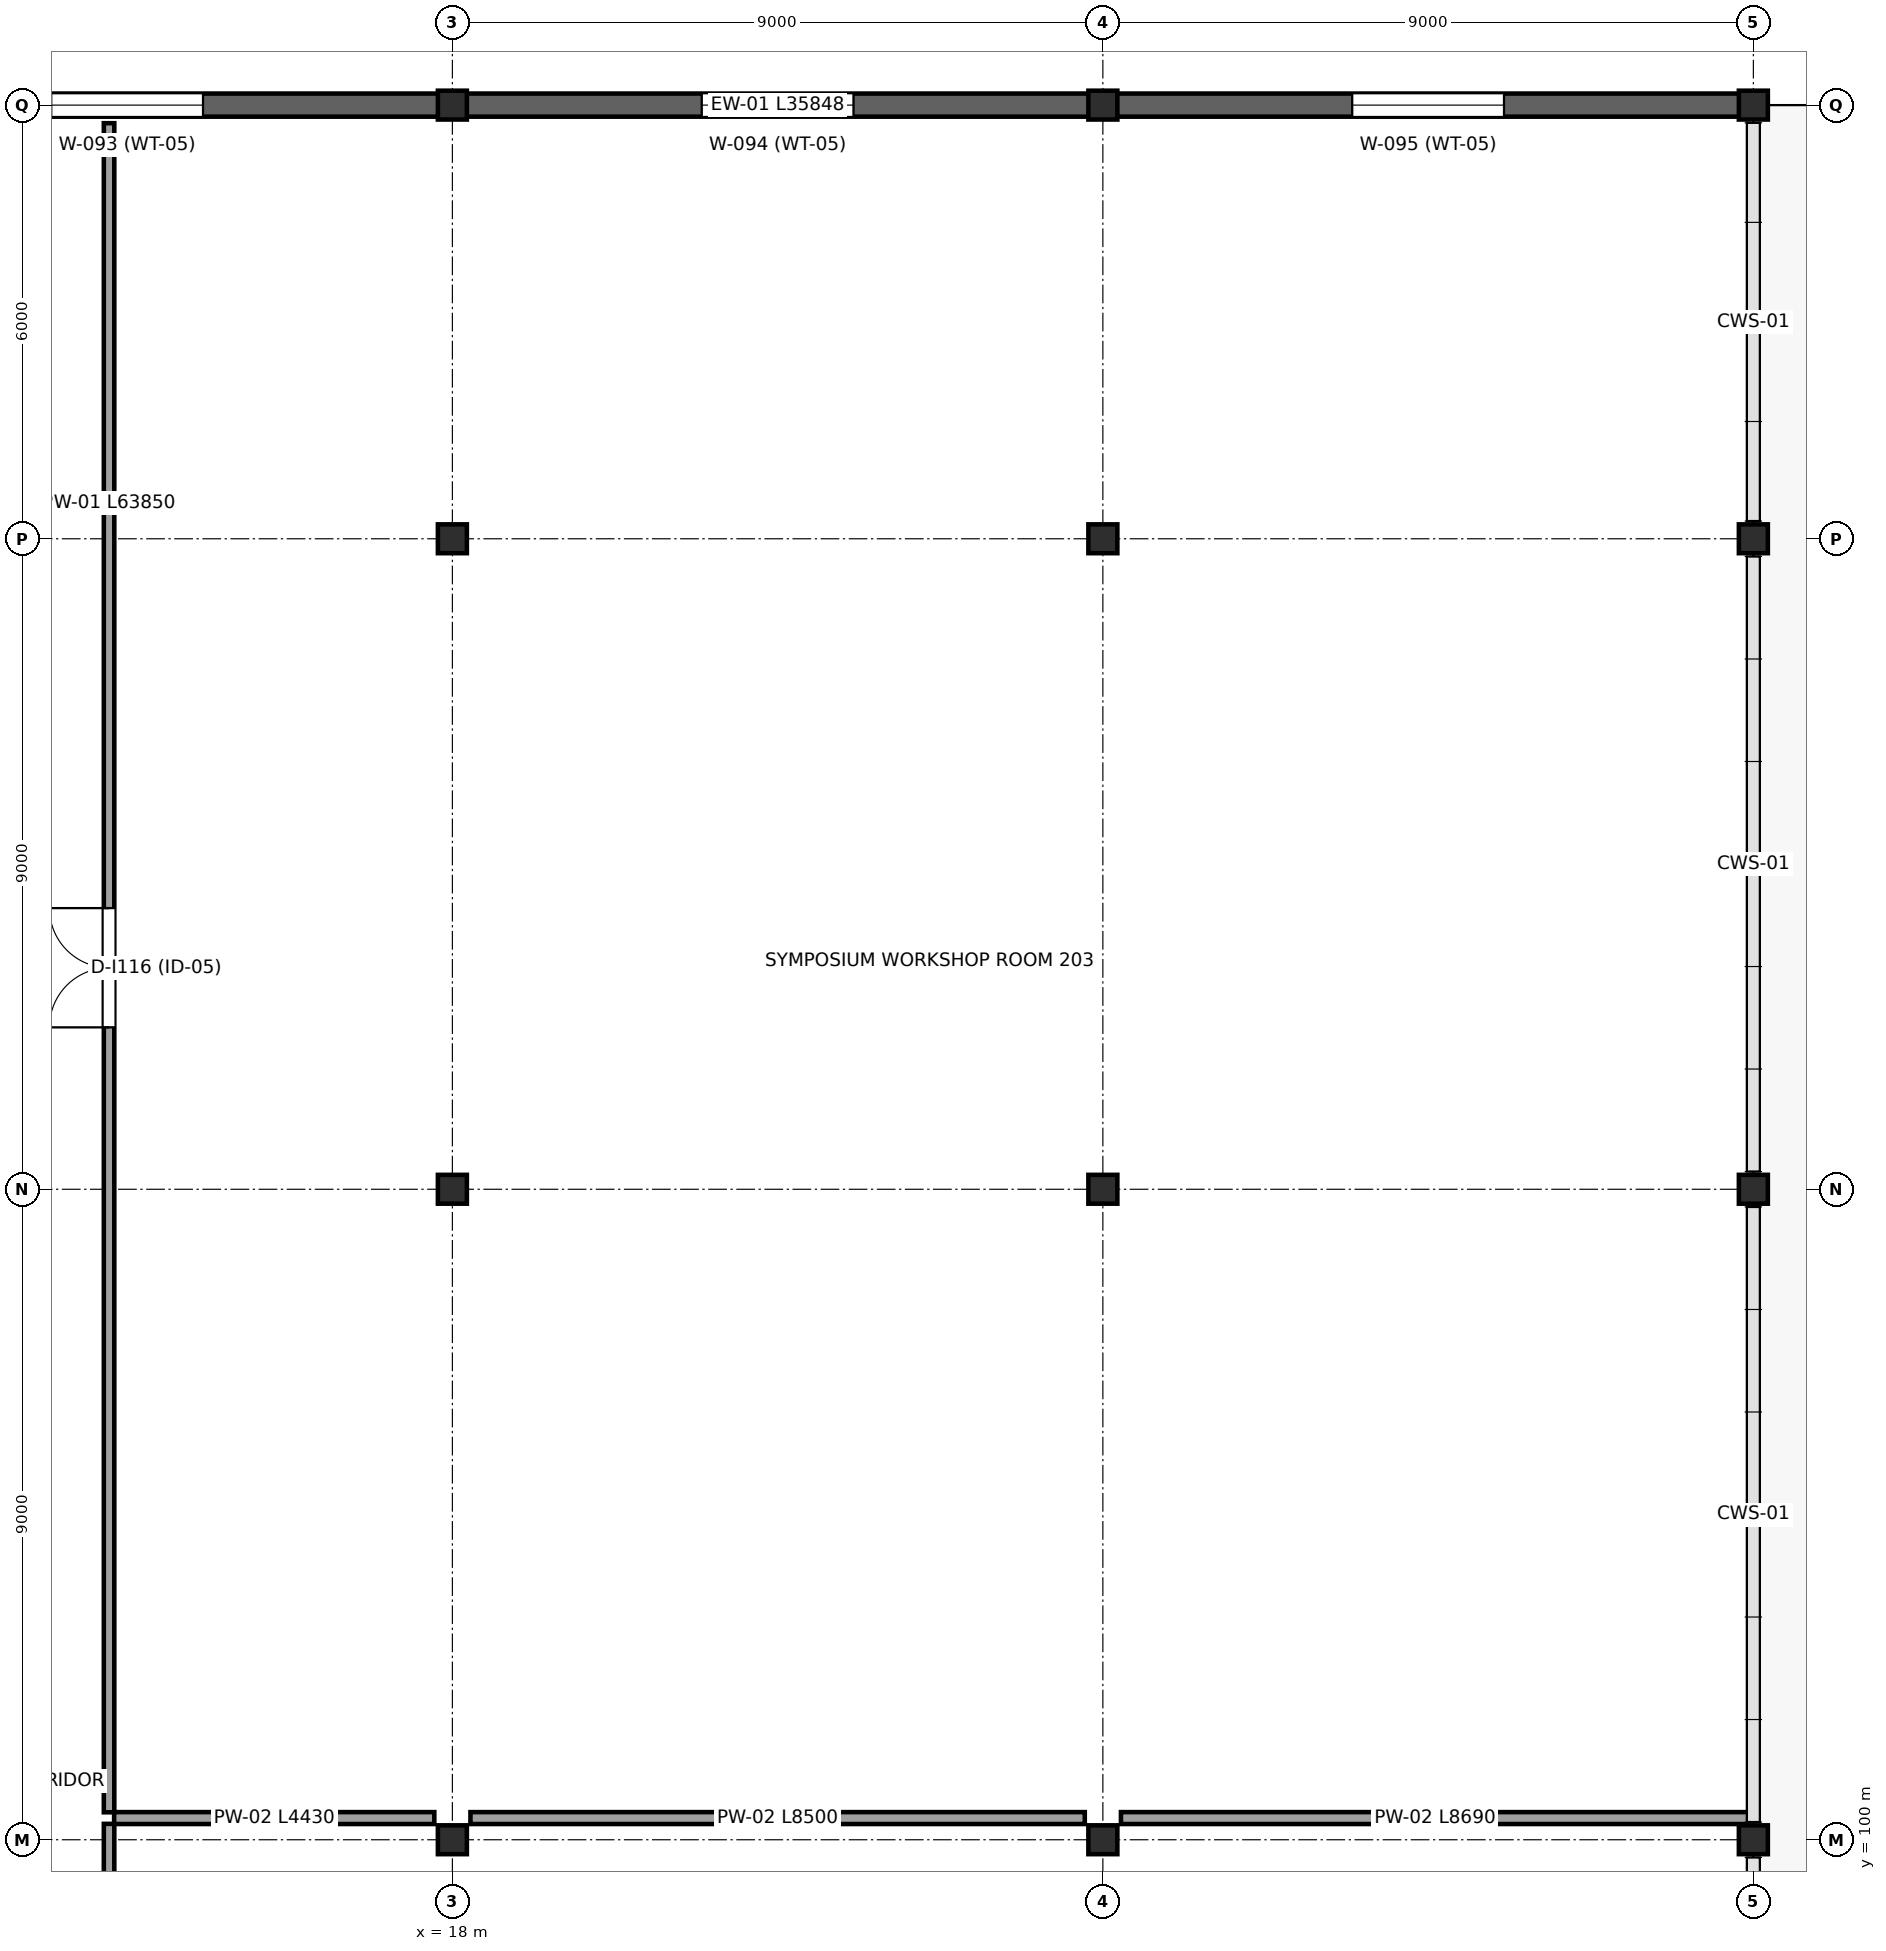
"""IFC4 building model, lengths in metres.
Left out: names, types, materials, properties, quantities, classifications, styles, units other than length and angle.
Written with IfcOpenShell. Run it as: python <this file> out.ifc"""

import sys

from ifc_helpers import new_model, si_unit, direction, frame, frame_2d, origin, origin_2d, place, context, subcontext, project, spatial, rectangle, i_section, extrude, element, fill, save


model = new_model("IFC4")
c1 = context("Model", 3, precision=1e-05, world=origin(), true_north=direction((0.0, 1.0)))
c2 = subcontext(c1, "Body", "Model", "MODEL_VIEW")
j1 = project(units=[si_unit("LENGTHUNIT", "METRE"), si_unit("PLANEANGLEUNIT", "RADIAN")], contexts=[c1])
p1 = place(None, origin())
s1 = spatial("IfcSite", under=j1, at=p1, CompositionType="ELEMENT")
p2 = place(p1, origin())
s2 = spatial("IfcBuilding", under=s1, at=p2, CompositionType="ELEMENT")
p3 = place(p2, frame((0.0, 0.0, 12.0)))
s3 = spatial("IfcBuildingStorey", under=s2, at=p3, CompositionType="ELEMENT", Elevation=12.0)
for number, where, z_axis, x_axis in (
    (1, (18.0, 100.0, 0.0), (0.0, 0.0, 1.0), (1.0, 0.0, 0.0)),
    (2, (18.0, 109.0, 0.0), (0.0, 0.0, 1.0), (1.0, 0.0, 0.0)),
    (3, (18.0, 118.0, 0.0), (0.0, 0.0, 1.0), (1.0, 0.0, 0.0)),
    (4, (18.0, 124.0, 0.0), (0.0, 0.0, 1.0), (1.0, 0.0, 0.0)),
    (5, (27.0, 100.0, 0.0), (0.0, 0.0, 1.0), (1.0, 0.0, 0.0)),
    (6, (27.0, 109.0, 0.0), (0.0, 0.0, 1.0), (1.0, 0.0, 0.0)),
    (7, (27.0, 118.0, 0.0), (0.0, 0.0, 1.0), (1.0, 0.0, 0.0)),
    (8, (27.0, 124.0, 0.0), (0.0, 0.0, 1.0), (1.0, 0.0, 0.0)),
    (9, (36.0, 100.0, 0.0), (0.0, 0.0, 1.0), (1.0, 0.0, 0.0)),
    (10, (36.0, 109.0, 0.0), (0.0, 0.0, 1.0), (1.0, 0.0, 0.0)),
    (11, (36.0, 118.0, 0.0), (0.0, 0.0, 1.0), (1.0, 0.0, 0.0)),
    (12, (36.0, 124.0, 0.0), (0.0, 0.0, 1.0), (1.0, 0.0, 0.0)),
):
    element("IfcColumn", number, at=place(p3, frame(where, z_axis=z_axis, x_axis=x_axis)), inside=s3, PredefinedType="COLUMN", context=c2, shape_type="SweptSolid", body=[
        extrude(i_section(OverallWidth=0.401, OverallDepth=0.399, WebThickness=0.025, FlangeThickness=0.04, at=origin_2d()), origin(), (0.0, 0.0, 1.0), 4.5),
    ])
p4 = place(p3, frame((9.019, 124.0, 0.0), z_axis=(0.0, 0.0, 1.0), x_axis=(1.0, 0.0, 0.0)))
e13 = element("IfcWall", 13, at=p4, inside=s3, PredefinedType="STANDARD", context=c2, shape_type="SweptSolid", body=[
    extrude(rectangle(XDim=8.962, YDim=0.32, at=frame_2d((4.481, 0.0))), origin(), (0.0, 0.0, 1.0), 4.28),
])
p5 = place(p4, frame((3.431, 0.0, 1.0)))
e14 = element("IfcOpeningElement", 14, at=p5, cuts=e13, PredefinedType="OPENING", context=c2, shape_type="SweptSolid", body=[
    extrude(rectangle(XDim=2.1, YDim=2.25, at=frame_2d((1.05, 1.125))), frame((0.0, 0.17, 0.0), z_axis=(0.0, -1.0, 0.0), x_axis=(1.0, 0.0, 0.0)), (0.0, 0.0, 1.0), 0.34),
])
p6 = place(p3, frame((18.019, 124.0, 0.0), z_axis=(0.0, 0.0, 1.0), x_axis=(1.0, 0.0, 0.0)))
e15 = element("IfcWall", 15, at=p6, inside=s3, PredefinedType="STANDARD", context=c2, shape_type="SweptSolid", body=[
    extrude(rectangle(XDim=8.962, YDim=0.32, at=frame_2d((4.481, 0.0))), origin(), (0.0, 0.0, 1.0), 4.28),
])
p7 = place(p6, frame((3.431, 0.0, 1.0)))
e16 = element("IfcOpeningElement", 16, at=p7, cuts=e15, PredefinedType="OPENING", context=c2, shape_type="SweptSolid", body=[
    extrude(rectangle(XDim=2.1, YDim=2.25, at=frame_2d((1.05, 1.125))), frame((0.0, 0.17, 0.0), z_axis=(0.0, -1.0, 0.0), x_axis=(1.0, 0.0, 0.0)), (0.0, 0.0, 1.0), 0.34),
])
p8 = place(p3, frame((27.019, 124.0, 0.0), z_axis=(0.0, 0.0, 1.0), x_axis=(1.0, 0.0, 0.0)))
e17 = element("IfcWall", 17, at=p8, inside=s3, PredefinedType="STANDARD", context=c2, shape_type="SweptSolid", body=[
    extrude(rectangle(XDim=8.962, YDim=0.32, at=frame_2d((4.481, 0.0))), origin(), (0.0, 0.0, 1.0), 4.28),
])
p9 = place(p8, frame((3.431, 0.0, 1.0)))
e18 = element("IfcOpeningElement", 18, at=p9, cuts=e17, PredefinedType="OPENING", context=c2, shape_type="SweptSolid", body=[
    extrude(rectangle(XDim=2.1, YDim=2.25, at=frame_2d((1.05, 1.125))), frame((0.0, 0.17, 0.0), z_axis=(0.0, -1.0, 0.0), x_axis=(1.0, 0.0, 0.0)), (0.0, 0.0, 1.0), 0.34),
])
p10 = place(p3, frame((13.25, 77.38, 0.0), z_axis=(0.0, 0.0, 1.0), x_axis=(0.0, 1.0, 0.0)))
e19 = element("IfcWall", 19, at=p10, inside=s3, PredefinedType="PARTITIONING", context=c2, shape_type="SweptSolid", body=[
    extrude(rectangle(XDim=22.84, YDim=0.145, at=frame_2d((11.42, 0.0))), origin(), (0.0, 0.0, 1.0), 3.6),
])
p11 = place(p10, frame((10.595, 0.0, 0.0)))
e20 = element("IfcOpeningElement", 20, at=p11, cuts=e19, PredefinedType="OPENING", context=c2, shape_type="SweptSolid", body=[
    extrude(rectangle(XDim=1.65, YDim=2.25, at=frame_2d((0.825, 1.125))), frame((0.0, 0.083, 0.0), z_axis=(0.0, -1.0, 0.0), x_axis=(1.0, 0.0, 0.0)), (0.0, 0.0, 1.0), 0.165),
])
p12 = place(p3, frame((13.25, 100.38, 0.0), z_axis=(0.0, 0.0, 1.0), x_axis=(0.0, 1.0, 0.0)))
e21 = element("IfcWall", 21, at=p12, inside=s3, PredefinedType="PARTITIONING", context=c2, shape_type="SweptSolid", body=[
    extrude(rectangle(XDim=23.37, YDim=0.145, at=frame_2d((11.685, 0.0))), origin(), (0.0, 0.0, 1.0), 3.6),
])
p13 = place(p12, frame((10.86, 0.0, 0.0)))
e22 = element("IfcOpeningElement", 22, at=p13, cuts=e21, PredefinedType="OPENING", context=c2, shape_type="SweptSolid", body=[
    extrude(rectangle(XDim=1.65, YDim=2.25, at=frame_2d((0.825, 1.125))), frame((0.0, 0.083, 0.0), z_axis=(0.0, -1.0, 0.0), x_axis=(1.0, 0.0, 0.0)), (0.0, 0.0, 1.0), 0.165),
])
p14 = place(p3, frame((13.32, 100.3, 0.0), z_axis=(0.0, 0.0, 1.0), x_axis=(1.0, 0.0, 0.0)))
e23 = element("IfcWall", 23, at=p14, inside=s3, PredefinedType="PARTITIONING", context=c2, shape_type="SweptSolid", body=[
    extrude(rectangle(XDim=4.43, YDim=0.165, at=frame_2d((2.215, 0.0))), origin(), (0.0, 0.0, 1.0), 3.6),
])
p15 = place(p3, frame((18.25, 100.3, 0.0), z_axis=(0.0, 0.0, 1.0), x_axis=(1.0, 0.0, 0.0)))
e24 = element("IfcWall", 24, at=p15, inside=s3, PredefinedType="PARTITIONING", context=c2, shape_type="SweptSolid", body=[
    extrude(rectangle(XDim=8.5, YDim=0.165, at=frame_2d((4.25, 0.0))), origin(), (0.0, 0.0, 1.0), 3.6),
])
p16 = place(p3, frame((27.25, 100.3, 0.0), z_axis=(0.0, 0.0, 1.0), x_axis=(1.0, 0.0, 0.0)))
e25 = element("IfcWall", 25, at=p16, inside=s3, PredefinedType="PARTITIONING", context=c2, shape_type="SweptSolid", body=[
    extrude(rectangle(XDim=8.69, YDim=0.165, at=frame_2d((4.345, 0.0))), origin(), (0.0, 0.0, 1.0), 3.6),
])
p17 = place(p5, origin())
e26 = element("IfcWindow", 26, at=p17, inside=s3, PartitioningType="SINGLE_PANEL", PredefinedType="WINDOW", context=c2, shape_type="SweptSolid", body=[
    extrude(rectangle(XDim=2.1, YDim=2.25, at=frame_2d((1.05, 1.125))), frame((0.0, 0.03, 0.0), z_axis=(0.0, -1.0, 0.0), x_axis=(1.0, 0.0, 0.0)), (0.0, 0.0, 1.0), 0.06),
])
fill(e14, e26)
p18 = place(p7, origin())
e27 = element("IfcWindow", 27, at=p18, inside=s3, PartitioningType="SINGLE_PANEL", PredefinedType="WINDOW", context=c2, shape_type="SweptSolid", body=[
    extrude(rectangle(XDim=2.1, YDim=2.25, at=frame_2d((1.05, 1.125))), frame((0.0, 0.03, 0.0), z_axis=(0.0, -1.0, 0.0), x_axis=(1.0, 0.0, 0.0)), (0.0, 0.0, 1.0), 0.06),
])
fill(e16, e27)
p19 = place(p9, origin())
e28 = element("IfcWindow", 28, at=p19, inside=s3, PartitioningType="SINGLE_PANEL", PredefinedType="WINDOW", context=c2, shape_type="SweptSolid", body=[
    extrude(rectangle(XDim=2.1, YDim=2.25, at=frame_2d((1.05, 1.125))), frame((0.0, 0.03, 0.0), z_axis=(0.0, -1.0, 0.0), x_axis=(1.0, 0.0, 0.0)), (0.0, 0.0, 1.0), 0.06),
])
fill(e18, e28)
p20 = place(p13, origin())
e29 = element("IfcDoor", 29, at=p20, inside=s3, OperationType="DOUBLE_DOOR_SINGLE_SWING", PredefinedType="DOOR", context=c2, shape_type="SweptSolid", body=[
    extrude(rectangle(XDim=1.65, YDim=2.25, at=frame_2d((0.825, 1.125))), frame((0.0, 0.025, 0.0), z_axis=(0.0, -1.0, 0.0), x_axis=(1.0, 0.0, 0.0)), (0.0, 0.0, 1.0), 0.05),
])
fill(e22, e29)
save(model, sys.argv[1])
